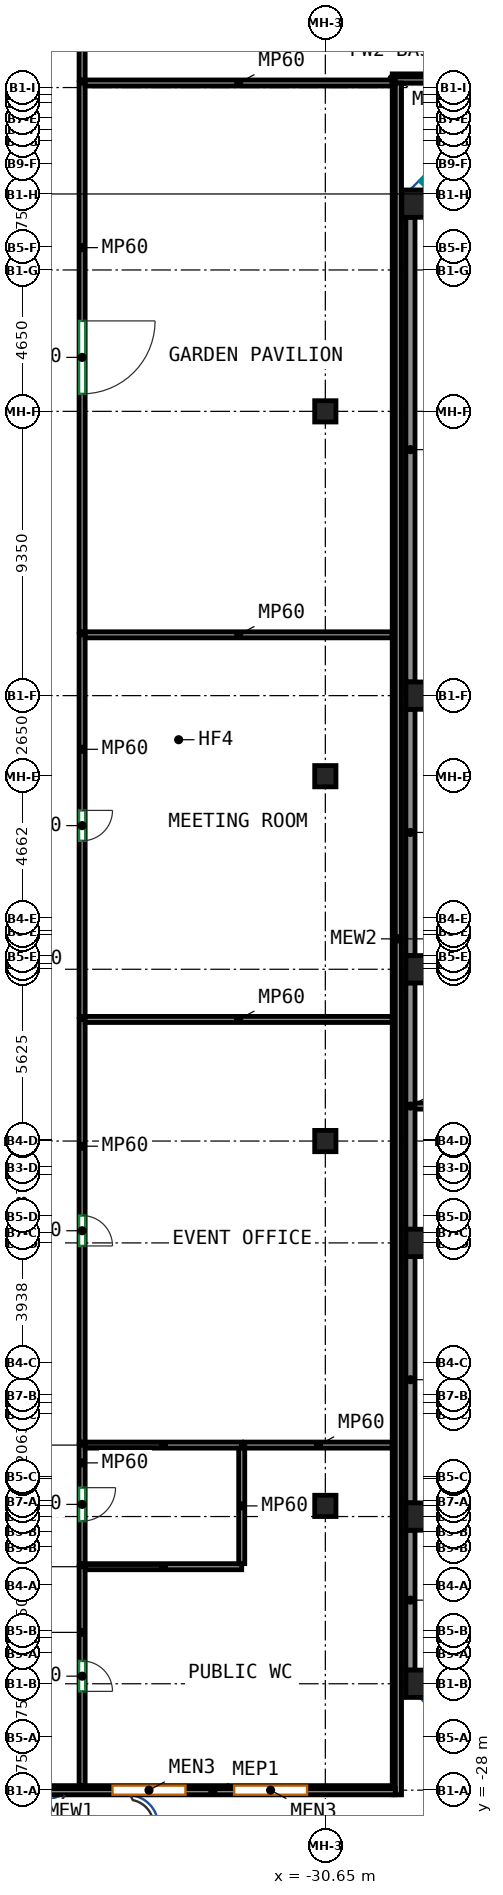
"""IFC4 building model, lengths in metres.
Left out: names, types, materials, properties, quantities, classifications, styles, units other than length and angle.
Written with IfcOpenShell. Run it as: python <this file> out.ifc"""

import sys

from ifc_helpers import new_model, si_unit, direction, frame, frame_2d, origin, origin_2d, place, context, subcontext, project, spatial, rectangle, extrude, source, transform, mapped, element, fill, save


model = new_model("IFC4")
c1 = context("Model", 3, precision=1e-05, world=origin(), true_north=direction((0.0, 1.0)))
c2 = subcontext(c1, "Body", "Model", "MODEL_VIEW")
j1 = project(units=[si_unit("LENGTHUNIT", "METRE"), si_unit("PLANEANGLEUNIT", "RADIAN")], contexts=[c1])
p1 = place(None, origin())
s1 = spatial("IfcSite", under=j1, at=p1, CompositionType="ELEMENT")
p2 = place(p1, origin())
s2 = spatial("IfcBuilding", under=s1, at=p2, CompositionType="ELEMENT")
p3 = place(p2, frame((0.0, 0.0, 22.5)))
s3 = spatial("IfcBuildingStorey", under=s2, at=p3, CompositionType="ELEMENT", Elevation=22.5)
m1 = source(origin(), c2, "Body", "SweptSolid", [
    extrude(rectangle(XDim=0.9, YDim=0.9, at=origin_2d()), origin(), (0.0, 0.0, 1.0), 4.22),
])
for number, where, z_axis, x_axis in (
    (1, (-27.682, 24.182, 0.0), (0.0, 0.0, 1.0), (1.0, 0.0, 0.0)),
    (2, (-27.55, -24.5, 0.0), (0.0, 0.0, 1.0), (1.0, 0.0, 0.0)),
    (3, (-27.55, -19.0, 0.0), (0.0, 0.0, 1.0), (1.0, 0.0, 0.0)),
    (4, (-27.55, -10.0, 0.0), (0.0, 0.0, 1.0), (1.0, 0.0, 0.0)),
    (5, (-27.55, -1.0, 0.0), (0.0, 0.0, 1.0), (1.0, 0.0, 0.0)),
    (6, (-27.55, 8.0, 0.0), (0.0, 0.0, 1.0), (1.0, 0.0, 0.0)),
):
    element("IfcColumn", number, at=place(p3, frame(where, z_axis=z_axis, x_axis=x_axis)), inside=s3, PredefinedType="COLUMN", context=c2, shape_type="MappedRepresentation", body=[
        mapped(m1, transform((0.0, 0.0, 0.0))),
    ])
m2 = source(origin(), c2, "Body", "SweptSolid", [
    extrude(rectangle(XDim=0.7, YDim=0.7, at=origin_2d()), origin(), (0.0, 0.0, 1.0), 4.22),
])
for number, where, z_axis, x_axis in (
    (7, (-30.65, -18.65, 0.0), (0.0, 0.0, 1.0), (1.0, 0.0, 0.0)),
    (8, (-30.65, -6.65, 0.0), (0.0, 0.0, 1.0), (1.0, 0.0, 0.0)),
    (9, (-30.65, 5.35, 0.0), (0.0, 0.0, 1.0), (1.0, 0.0, 0.0)),
    (10, (-30.65, 17.35, 0.0), (0.0, 0.0, 1.0), (1.0, 0.0, 0.0)),
):
    element("IfcColumn", number, at=place(p3, frame(where, z_axis=z_axis, x_axis=x_axis)), inside=s3, PredefinedType="COLUMN", context=c2, shape_type="MappedRepresentation", body=[
        mapped(m2, transform((0.0, 0.0, 0.0))),
    ])
m3 = source(origin(), c2, "Body", "SweptSolid", [
    extrude(rectangle(XDim=15.282, YDim=0.3, at=frame_2d((7.641, 0.0))), origin(), (0.0, 0.0, 1.0), 4.22),
])
p4 = place(p3, frame((-27.85, 23.732, 0.0), z_axis=(0.0, 0.0, 1.0), x_axis=(0.0, -1.0, 0.0)))
e11 = element("IfcWall", 11, at=p4, inside=s3, PredefinedType="SOLIDWALL", context=c2, shape_type="MappedRepresentation", body=[
    mapped(m3, transform((0.0, 0.0, 0.0))),
])
m4 = source(origin(), c2, "Body", "SweptSolid", [
    extrude(rectangle(XDim=8.1, YDim=0.3, at=frame_2d((4.05, 0.0))), origin(), (0.0, 0.0, 1.0), 4.22),
])
for number, where, z_axis, x_axis in (
    (12, (-27.85, 7.55, 0.0), (0.0, 0.0, 1.0), (0.0, -1.0, 0.0)),
    (13, (-27.85, -1.45, 0.0), (0.0, 0.0, 1.0), (0.0, -1.0, 0.0)),
    (14, (-27.85, -10.45, 0.0), (0.0, 0.0, 1.0), (0.0, -1.0, 0.0)),
):
    element("IfcWall", number, at=place(p3, frame(where, z_axis=z_axis, x_axis=x_axis)), inside=s3, PredefinedType="SOLIDWALL", context=c2, shape_type="MappedRepresentation", body=[
        mapped(m4, transform((0.0, 0.0, 0.0))),
    ])
m5 = source(origin(), c2, "Body", "SweptSolid", [
    extrude(rectangle(XDim=4.6, YDim=0.3, at=frame_2d((2.3, 0.0))), origin(), (0.0, 0.0, 1.0), 4.22),
])
p5 = place(p3, frame((-27.85, -19.45, 0.0), z_axis=(0.0, 0.0, 1.0), x_axis=(0.0, -1.0, 0.0)))
e15 = element("IfcWall", 15, at=p5, inside=s3, PredefinedType="SOLIDWALL", context=c2, shape_type="MappedRepresentation", body=[
    mapped(m5, transform((0.0, 0.0, 0.0))),
])
m6 = source(origin(), c2, "Body", "SweptSolid", [
    extrude(rectangle(XDim=56.3, YDim=0.3, at=frame_2d((28.15, 0.0))), origin(), (0.0, 0.0, 1.0), 4.22),
])
p6 = place(p3, frame((27.85, 28.3, 0.0), z_axis=(0.0, 0.0, 1.0), x_axis=(-1.0, 0.0, 0.0)))
e16 = element("IfcWall", 16, at=p6, inside=s3, PredefinedType="SOLIDWALL", context=c2, shape_type="MappedRepresentation", body=[
    mapped(m6, transform((0.0, 0.0, 0.0))),
])
m7 = source(origin(), c2, "Body", "SweptSolid", [
    extrude(rectangle(XDim=56.3, YDim=0.3, at=frame_2d((28.15, 0.0))), origin(), (0.0, 0.0, 1.0), 4.22),
])
p7 = place(p3, frame((-28.3, 28.15, 0.0), z_axis=(0.0, 0.0, 1.0), x_axis=(0.0, -1.0, 0.0)))
e17 = element("IfcWall", 17, at=p7, inside=s3, PredefinedType="SOLIDWALL", context=c2, shape_type="MappedRepresentation", body=[
    mapped(m7, transform((0.0, 0.0, 0.0))),
])
m8 = source(origin(), c2, "Body", "SweptSolid", [
    extrude(rectangle(XDim=12.0, YDim=0.3, at=frame_2d((6.0, 0.0))), origin(), (0.0, 0.0, 1.0), 4.22),
])
p8 = place(p3, frame((-28.45, -28.0, 0.0), z_axis=(0.0, 0.0, 1.0), x_axis=(-1.0, 0.0, 0.0)))
e18 = element("IfcWall", 18, at=p8, inside=s3, PredefinedType="SOLIDWALL", context=c2, shape_type="MappedRepresentation", body=[
    mapped(m8, transform((0.0, 0.0, 0.0))),
])
p9 = place(p8, frame((2.8, 0.0, 0.9)))
e19 = element("IfcOpeningElement", 19, at=p9, cuts=e18, PredefinedType="OPENING", context=c2, shape_type="SweptSolid", body=[
    extrude(rectangle(XDim=2.4, YDim=1.8, at=frame_2d((1.2, 0.9))), frame((0.0, 0.16, 0.0), z_axis=(0.0, -1.0, 0.0), x_axis=(1.0, 0.0, 0.0)), (0.0, 0.0, 1.0), 0.32),
])
p10 = place(p8, frame((6.8, 0.0, 0.9)))
e20 = element("IfcOpeningElement", 20, at=p10, cuts=e18, PredefinedType="OPENING", context=c2, shape_type="SweptSolid", body=[
    extrude(rectangle(XDim=2.4, YDim=1.8, at=frame_2d((1.2, 0.9))), frame((0.0, 0.16, 0.0), z_axis=(0.0, -1.0, 0.0), x_axis=(1.0, 0.0, 0.0)), (0.0, 0.0, 1.0), 0.32),
])
m9 = source(origin(), c2, "Body", "SweptSolid", [
    extrude(rectangle(XDim=56.3, YDim=0.2, at=frame_2d((28.15, 0.0))), origin(), (0.0, 0.0, 1.0), 1.1),
])
p11 = place(p3, frame((27.95, 28.25, 4.5), z_axis=(0.0, 0.0, 1.0), x_axis=(-1.0, 0.0, 0.0)))
e21 = element("IfcWall", 21, at=p11, inside=s3, PredefinedType="PARAPET", context=c2, shape_type="MappedRepresentation", body=[
    mapped(m9, transform((0.0, 0.0, 0.0))),
])
m10 = source(origin(), c2, "Body", "SweptSolid", [
    extrude(rectangle(XDim=56.3, YDim=0.2, at=frame_2d((28.15, 0.0))), origin(), (0.0, 0.0, 1.0), 1.1),
])
p12 = place(p3, frame((-28.25, 28.15, 4.5), z_axis=(0.0, 0.0, 1.0), x_axis=(0.0, -1.0, 0.0)))
e22 = element("IfcWall", 22, at=p12, inside=s3, PredefinedType="PARAPET", context=c2, shape_type="MappedRepresentation", body=[
    mapped(m10, transform((0.0, 0.0, 0.0))),
])
m11 = source(origin(), c2, "Body", "SweptSolid", [
    extrude(rectangle(XDim=12.0, YDim=0.2, at=frame_2d((6.0, 0.0))), origin(), (0.0, 0.0, 1.0), 1.1),
])
p13 = place(p3, frame((-28.35, -28.05, 4.5), z_axis=(0.0, 0.0, 1.0), x_axis=(-1.0, 0.0, 0.0)))
e23 = element("IfcWall", 23, at=p13, inside=s3, PredefinedType="PARAPET", context=c2, shape_type="MappedRepresentation", body=[
    mapped(m11, transform((0.0, 0.0, 0.0))),
])
p14 = place(p3, frame((-27.75, -5.5, 0.0), z_axis=(0.0, 0.0, 1.0), x_axis=(1.0, 0.0, 0.0)))
e24 = element("IfcWall", 24, at=p14, inside=s3, PredefinedType="PARTITIONING", context=c2, shape_type="SweptSolid", body=[
    extrude(rectangle(XDim=10.35, YDim=0.2, at=frame_2d((5.175, 0.0))), origin(), (0.0, 0.0, 1.0), 4.22),
])
m12 = source(origin(), c2, "Body", "SweptSolid", [
    extrude(rectangle(XDim=7.2, YDim=0.2, at=frame_2d((3.6, 0.0))), origin(), (0.0, 0.0, 1.0), 4.22),
])
p15 = place(p3, frame((-38.65, -20.65, 0.0), z_axis=(0.0, 0.0, 1.0), x_axis=(0.0, -1.0, 0.0)))
e25 = element("IfcWall", 25, at=p15, inside=s3, PredefinedType="PARTITIONING", context=c2, shape_type="MappedRepresentation", body=[
    mapped(m12, transform((0.0, 0.0, 0.0))),
])
p16 = place(p15, frame((3.1, 0.0, 0.0)))
e26 = element("IfcOpeningElement", 26, at=p16, cuts=e25, PredefinedType="OPENING", context=c2, shape_type="SweptSolid", body=[
    extrude(rectangle(XDim=1.0, YDim=2.1, at=frame_2d((0.5, 1.05))), frame((0.0, 0.11, 0.0), z_axis=(0.0, -1.0, 0.0), x_axis=(1.0, 0.0, 0.0)), (0.0, 0.0, 1.0), 0.22),
])
m13 = source(origin(), c2, "Body", "SweptSolid", [
    extrude(rectangle(XDim=5.15, YDim=0.2, at=frame_2d((2.575, 0.0))), origin(), (0.0, 0.0, 1.0), 4.22),
])
p17 = place(p3, frame((-38.55, -20.65, 0.0), z_axis=(0.0, 0.0, 1.0), x_axis=(1.0, 0.0, 0.0)))
e27 = element("IfcWall", 27, at=p17, inside=s3, PredefinedType="PARTITIONING", context=c2, shape_type="MappedRepresentation", body=[
    mapped(m13, transform((0.0, 0.0, 0.0))),
])
m14 = source(origin(), c2, "Body", "SweptSolid", [
    extrude(rectangle(XDim=3.9, YDim=0.2, at=frame_2d((1.95, 0.0))), origin(), (0.0, 0.0, 1.0), 3.42),
])
p18 = place(p3, frame((-38.65, -16.65, 0.0), z_axis=(0.0, 0.0, 1.0), x_axis=(0.0, -1.0, 0.0)))
e28 = element("IfcWall", 28, at=p18, inside=s3, PredefinedType="PARTITIONING", context=c2, shape_type="MappedRepresentation", body=[
    mapped(m14, transform((0.0, 0.0, 0.0))),
])
p19 = place(p18, frame((1.4, 0.0, 0.0)))
e29 = element("IfcOpeningElement", 29, at=p19, cuts=e28, PredefinedType="OPENING", context=c2, shape_type="SweptSolid", body=[
    extrude(rectangle(XDim=1.1, YDim=2.1, at=frame_2d((0.55, 1.05))), frame((0.0, 0.11, 0.0), z_axis=(0.0, -1.0, 0.0), x_axis=(1.0, 0.0, 0.0)), (0.0, 0.0, 1.0), 0.22),
])
m15 = source(origin(), c2, "Body", "SweptSolid", [
    extrude(rectangle(XDim=5.15, YDim=0.2, at=frame_2d((2.575, 0.0))), origin(), (0.0, 0.0, 1.0), 3.62),
])
p20 = place(p3, frame((-38.55, -16.65, 0.0), z_axis=(0.0, 0.0, 1.0), x_axis=(1.0, 0.0, 0.0)))
e30 = element("IfcWall", 30, at=p20, inside=s3, PredefinedType="PARTITIONING", context=c2, shape_type="MappedRepresentation", body=[
    mapped(m15, transform((0.0, 0.0, 0.0))),
])
m16 = source(origin(), c2, "Body", "SweptSolid", [
    extrude(rectangle(XDim=13.9, YDim=0.2, at=frame_2d((6.95, 0.0))), origin(), (0.0, 0.0, 1.0), 3.42),
])
p21 = place(p3, frame((-38.65, -2.65, 0.0), z_axis=(0.0, 0.0, 1.0), x_axis=(0.0, -1.0, 0.0)))
e31 = element("IfcWall", 31, at=p21, inside=s3, PredefinedType="PARTITIONING", context=c2, shape_type="MappedRepresentation", body=[
    mapped(m16, transform((0.0, 0.0, 0.0))),
])
p22 = place(p21, frame((6.45, 0.0, 0.0)))
e32 = element("IfcOpeningElement", 32, at=p22, cuts=e31, PredefinedType="OPENING", context=c2, shape_type="SweptSolid", body=[
    extrude(rectangle(XDim=1.0, YDim=2.1, at=frame_2d((0.5, 1.05))), frame((0.0, 0.11, 0.0), z_axis=(0.0, -1.0, 0.0), x_axis=(1.0, 0.0, 0.0)), (0.0, 0.0, 1.0), 0.22),
])
m17 = source(origin(), c2, "Body", "SweptSolid", [
    extrude(rectangle(XDim=10.1, YDim=0.2, at=frame_2d((5.05, 0.0))), origin(), (0.0, 0.0, 1.0), 3.42),
])
p23 = place(p3, frame((-38.55, -2.65, 0.0), z_axis=(0.0, 0.0, 1.0), x_axis=(1.0, 0.0, 0.0)))
e33 = element("IfcWall", 33, at=p23, inside=s3, PredefinedType="PARTITIONING", context=c2, shape_type="MappedRepresentation", body=[
    mapped(m17, transform((0.0, 0.0, 0.0))),
])
m18 = source(origin(), c2, "Body", "SweptSolid", [
    extrude(rectangle(XDim=12.55, YDim=0.2, at=frame_2d((6.275, 0.0))), origin(), (0.0, 0.0, 1.0), 3.42),
])
p24 = place(p3, frame((-38.65, 10.0, 0.0), z_axis=(0.0, 0.0, 1.0), x_axis=(0.0, -1.0, 0.0)))
e34 = element("IfcWall", 34, at=p24, inside=s3, PredefinedType="PARTITIONING", context=c2, shape_type="MappedRepresentation", body=[
    mapped(m18, transform((0.0, 0.0, 0.0))),
])
p25 = place(p24, frame((5.775, 0.0, 0.0)))
e35 = element("IfcOpeningElement", 35, at=p25, cuts=e34, PredefinedType="OPENING", context=c2, shape_type="SweptSolid", body=[
    extrude(rectangle(XDim=1.0, YDim=2.1, at=frame_2d((0.5, 1.05))), frame((0.0, 0.11, 0.0), z_axis=(0.0, -1.0, 0.0), x_axis=(1.0, 0.0, 0.0)), (0.0, 0.0, 1.0), 0.22),
])
p26 = place(p3, frame((-38.55, 10.0, 0.0), z_axis=(0.0, 0.0, 1.0), x_axis=(1.0, 0.0, 0.0)))
e36 = element("IfcWall", 36, at=p26, inside=s3, PredefinedType="PARTITIONING", context=c2, shape_type="MappedRepresentation", body=[
    mapped(m17, transform((0.0, 0.0, 0.0))),
])
m19 = source(origin(), c2, "Body", "SweptSolid", [
    extrude(rectangle(XDim=18.05, YDim=0.2, at=frame_2d((9.025, 0.0))), origin(), (0.0, 0.0, 1.0), 3.42),
])
p27 = place(p3, frame((-38.65, 28.15, 0.0), z_axis=(0.0, 0.0, 1.0), x_axis=(0.0, -1.0, 0.0)))
e37 = element("IfcWall", 37, at=p27, inside=s3, PredefinedType="PARTITIONING", context=c2, shape_type="MappedRepresentation", body=[
    mapped(m19, transform((0.0, 0.0, 0.0))),
])
p28 = place(p27, frame((7.825, 0.0, 0.0)))
e38 = element("IfcOpeningElement", 38, at=p28, cuts=e37, PredefinedType="OPENING", context=c2, shape_type="SweptSolid", body=[
    extrude(rectangle(XDim=2.4, YDim=2.4, at=frame_2d((1.2, 1.2))), frame((0.0, 0.11, 0.0), z_axis=(0.0, -1.0, 0.0), x_axis=(1.0, 0.0, 0.0)), (0.0, 0.0, 1.0), 0.22),
])
p29 = place(p3, frame((-38.55, 28.15, 0.0), z_axis=(0.0, 0.0, 1.0), x_axis=(1.0, 0.0, 0.0)))
e39 = element("IfcWall", 39, at=p29, inside=s3, PredefinedType="PARTITIONING", context=c2, shape_type="MappedRepresentation", body=[
    mapped(m17, transform((0.0, 0.0, 0.0))),
])
m20 = source(origin(), c2, "Body", "SweptSolid", [
    extrude(rectangle(XDim=10.4, YDim=0.2, at=frame_2d((5.2, 0.0))), origin(), (0.0, 0.0, 1.0), 3.42),
])
p30 = place(p3, frame((-38.65, 38.65, 0.0), z_axis=(0.0, 0.0, 1.0), x_axis=(0.0, -1.0, 0.0)))
e40 = element("IfcWall", 40, at=p30, inside=s3, PredefinedType="PARTITIONING", context=c2, shape_type="MappedRepresentation", body=[
    mapped(m20, transform((0.0, 0.0, 0.0))),
])
m21 = source(origin(), c2, "Body", "SweptSolid", [
    extrude(rectangle(XDim=3.8, YDim=0.2, at=frame_2d((1.9, 0.0))), origin(), (0.0, 0.0, 1.0), 3.42),
])
p31 = place(p3, frame((-33.4, -20.55, 0.0), z_axis=(0.0, 0.0, 1.0), x_axis=(0.0, 1.0, 0.0)))
e41 = element("IfcWall", 41, at=p31, inside=s3, PredefinedType="PARTITIONING", context=c2, shape_type="MappedRepresentation", body=[
    mapped(m21, transform((0.0, 0.0, 0.0))),
])
m22 = source(origin(), c2, "Body", "SweptSolid", [
    extrude(rectangle(XDim=4.85, YDim=0.2, at=frame_2d((2.425, 0.0))), origin(), (0.0, 0.0, 1.0), 3.42),
])
p32 = place(p3, frame((-33.3, -16.65, 0.0), z_axis=(0.0, 0.0, 1.0), x_axis=(1.0, 0.0, 0.0)))
e42 = element("IfcWall", 42, at=p32, inside=s3, PredefinedType="PARTITIONING", context=c2, shape_type="MappedRepresentation", body=[
    mapped(m22, transform((0.0, 0.0, 0.0))),
])
p33 = place(p9, origin())
e43 = element("IfcWindow", 43, at=p33, inside=s3, PartitioningType="SINGLE_PANEL", PredefinedType="WINDOW", context=c2, shape_type="SweptSolid", body=[
    extrude(rectangle(XDim=2.4, YDim=1.8, at=frame_2d((1.2, 0.9))), frame((0.0, 0.03, 0.0), z_axis=(0.0, -1.0, 0.0), x_axis=(1.0, 0.0, 0.0)), (0.0, 0.0, 1.0), 0.06),
])
fill(e19, e43)
p34 = place(p10, origin())
e44 = element("IfcWindow", 44, at=p34, inside=s3, PartitioningType="SINGLE_PANEL", PredefinedType="WINDOW", context=c2, shape_type="SweptSolid", body=[
    extrude(rectangle(XDim=2.4, YDim=1.8, at=frame_2d((1.2, 0.9))), frame((0.0, 0.03, 0.0), z_axis=(0.0, -1.0, 0.0), x_axis=(1.0, 0.0, 0.0)), (0.0, 0.0, 1.0), 0.06),
])
fill(e20, e44)
p35 = place(p16, origin())
e45 = element("IfcDoor", 45, at=p35, inside=s3, OperationType="SINGLE_SWING_RIGHT", PredefinedType="DOOR", context=c2, shape_type="SweptSolid", body=[
    extrude(rectangle(XDim=1.0, YDim=2.1, at=frame_2d((0.5, 1.05))), frame((0.0, 0.025, 0.0), z_axis=(0.0, -1.0, 0.0), x_axis=(1.0, 0.0, 0.0)), (0.0, 0.0, 1.0), 0.05),
])
fill(e26, e45)
p36 = place(p19, origin())
e46 = element("IfcDoor", 46, at=p36, inside=s3, OperationType="SINGLE_SWING_LEFT", PredefinedType="DOOR", context=c2, shape_type="SweptSolid", body=[
    extrude(rectangle(XDim=1.1, YDim=2.1, at=frame_2d((0.55, 1.05))), frame((0.0, 0.025, 0.0), z_axis=(0.0, -1.0, 0.0), x_axis=(1.0, 0.0, 0.0)), (0.0, 0.0, 1.0), 0.05),
])
fill(e29, e46)
p37 = place(p22, origin())
e47 = element("IfcDoor", 47, at=p37, inside=s3, OperationType="SINGLE_SWING_RIGHT", PredefinedType="DOOR", context=c2, shape_type="SweptSolid", body=[
    extrude(rectangle(XDim=1.0, YDim=2.1, at=frame_2d((0.5, 1.05))), frame((0.0, 0.025, 0.0), z_axis=(0.0, -1.0, 0.0), x_axis=(1.0, 0.0, 0.0)), (0.0, 0.0, 1.0), 0.05),
])
fill(e32, e47)
p38 = place(p25, origin())
e48 = element("IfcDoor", 48, at=p38, inside=s3, OperationType="SINGLE_SWING_LEFT", PredefinedType="DOOR", context=c2, shape_type="SweptSolid", body=[
    extrude(rectangle(XDim=1.0, YDim=2.1, at=frame_2d((0.5, 1.05))), frame((0.0, 0.025, 0.0), z_axis=(0.0, -1.0, 0.0), x_axis=(1.0, 0.0, 0.0)), (0.0, 0.0, 1.0), 0.05),
])
fill(e35, e48)
p39 = place(p28, origin())
e49 = element("IfcDoor", 49, at=p39, inside=s3, OperationType="DOUBLE_DOOR_SINGLE_SWING", PredefinedType="DOOR", context=c2, shape_type="SweptSolid", body=[
    extrude(rectangle(XDim=2.4, YDim=2.4, at=frame_2d((1.2, 1.2))), frame((0.0, 0.025, 0.0), z_axis=(0.0, -1.0, 0.0), x_axis=(1.0, 0.0, 0.0)), (0.0, 0.0, 1.0), 0.05),
])
fill(e38, e49)
save(model, sys.argv[1])
